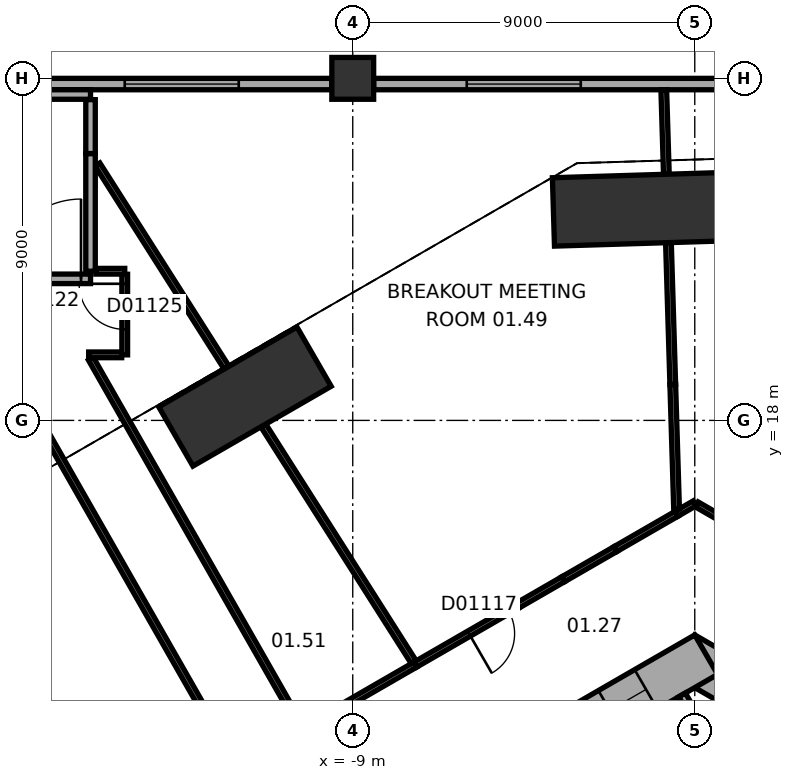
"""IFC4 building model, lengths in metres.
Left out: names, types, materials, properties, quantities, classifications, styles, units other than length and angle.
Written with IfcOpenShell. Run it as: python <this file> out.ifc"""

import sys

from ifc_helpers import new_model, si_unit, direction, frame, frame_2d, origin, origin_2d, place, context, subcontext, project, spatial, rectangle, extrude, element, fill, save


model = new_model("IFC4")
c1 = context("Model", 3, precision=1e-05, world=origin(), true_north=direction((0.0, 1.0)))
c2 = subcontext(c1, "Body", "Model", "MODEL_VIEW")
j1 = project(units=[si_unit("LENGTHUNIT", "METRE"), si_unit("PLANEANGLEUNIT", "RADIAN")], contexts=[c1])
p1 = place(None, origin())
s1 = spatial("IfcSite", under=j1, at=p1, CompositionType="ELEMENT")
p2 = place(p1, origin())
s2 = spatial("IfcBuilding", under=s1, at=p2, CompositionType="ELEMENT")
p3 = place(p2, frame((0.0, 0.0, 7.5)))
s3 = spatial("IfcBuildingStorey", under=s2, at=p3, CompositionType="ELEMENT", Elevation=7.5)
p4 = place(p3, frame((-0.72, 23.577, 0.0), z_axis=(0.0, 0.0, 1.0), x_axis=(-0.999533644135, -0.030536768695, 0.0)))
e1 = element("IfcColumn", 1, at=p4, inside=s3, PredefinedType="COLUMN", context=c2, shape_type="SweptSolid", body=[
    extrude(rectangle(XDim=6.0, YDim=1.8, at=origin_2d()), origin(), (0.0, 0.0, 1.0), 5.5),
])
p5 = place(p3, frame((-11.837, 18.627, 0.0), z_axis=(0.0, 0.0, 1.0), x_axis=(-0.866028021766, -0.499995465495, 0.0)))
e2 = element("IfcColumn", 2, at=p5, inside=s3, PredefinedType="COLUMN", context=c2, shape_type="SweptSolid", body=[
    extrude(rectangle(XDim=4.2, YDim=1.8, at=origin_2d()), origin(), (0.0, 0.0, 1.0), 5.5),
])
p6 = place(p3, frame((-9.0, 27.0, 0.0), z_axis=(0.0, 0.0, 1.0), x_axis=(1.0, 0.0, 0.0)))
e3 = element("IfcColumn", 3, at=p6, inside=s3, PredefinedType="COLUMN", context=c2, shape_type="SweptSolid", body=[
    extrude(rectangle(XDim=1.1, YDim=1.1, at=origin_2d()), origin(), (0.0, 0.0, 1.0), 5.5),
])
p7 = place(p3, frame((10.4, 5.658, 0.0), z_axis=(0.0, 0.0, 1.0), x_axis=(-0.866021384402, 0.500006961711, 0.0)))
e4 = element("IfcWall", 4, at=p7, inside=s3, PredefinedType="SHEAR", context=c2, shape_type="SweptSolid", body=[
    extrude(rectangle(XDim=12.355, YDim=1.2, at=frame_2d((6.178, 0.0))), origin(), (0.0, 0.0, 1.0), 5.5),
])
p8 = place(p7, frame((2.728, 0.0, 0.0)))
e5 = element("IfcOpeningElement", 5, at=p8, cuts=e4, PredefinedType="OPENING", context=c2, shape_type="SweptSolid", body=[
    extrude(rectangle(XDim=1.1, YDim=2.1, at=frame_2d((0.55, 1.05))), frame((0.0, 0.61, 0.0), z_axis=(0.0, -1.0, 0.0), x_axis=(1.0, 0.0, 0.0)), (0.0, 0.0, 1.0), 1.22),
])
p9 = place(p7, frame((5.328, 0.0, 0.0)))
e6 = element("IfcOpeningElement", 6, at=p9, cuts=e4, PredefinedType="OPENING", context=c2, shape_type="SweptSolid", body=[
    extrude(rectangle(XDim=1.1, YDim=2.1, at=frame_2d((0.55, 1.05))), frame((0.0, 0.61, 0.0), z_axis=(0.0, -1.0, 0.0), x_axis=(1.0, 0.0, 0.0)), (0.0, 0.0, 1.0), 1.22),
])
p10 = place(p7, frame((7.928, 0.0, 0.0)))
e7 = element("IfcOpeningElement", 7, at=p10, cuts=e4, PredefinedType="OPENING", context=c2, shape_type="SweptSolid", body=[
    extrude(rectangle(XDim=1.1, YDim=2.1, at=frame_2d((0.55, 1.05))), frame((0.0, 0.61, 0.0), z_axis=(0.0, -1.0, 0.0), x_axis=(1.0, 0.0, 0.0)), (0.0, 0.0, 1.0), 1.22),
])
p11 = place(p3, frame((0.3, 11.836, 0.0), z_axis=(0.0, 0.0, 1.0), x_axis=(-0.866021384402, -0.500006961711, 0.0)))
e8 = element("IfcWall", 8, at=p11, inside=s3, PredefinedType="SHEAR", context=c2, shape_type="SweptSolid", body=[
    extrude(rectangle(XDim=12.355, YDim=1.2, at=frame_2d((6.178, 0.0))), origin(), (0.0, 0.0, 1.0), 5.5),
])
p12 = place(p11, frame((6.378, 0.0, 0.0)))
e9 = element("IfcOpeningElement", 9, at=p12, cuts=e8, PredefinedType="OPENING", context=c2, shape_type="SweptSolid", body=[
    extrude(rectangle(XDim=1.5, YDim=2.1, at=frame_2d((0.75, 1.05))), frame((0.0, 0.61, 0.0), z_axis=(0.0, -1.0, 0.0), x_axis=(1.0, 0.0, 0.0)), (0.0, 0.0, 1.0), 1.22),
])
p13 = place(p11, frame((1.828, 0.0, 0.0)))
e10 = element("IfcOpeningElement", 10, at=p13, cuts=e8, PredefinedType="OPENING", context=c2, shape_type="SweptSolid", body=[
    extrude(rectangle(XDim=1.1, YDim=2.1, at=frame_2d((0.55, 1.05))), frame((0.0, 0.61, 0.0), z_axis=(0.0, -1.0, 0.0), x_axis=(1.0, 0.0, 0.0)), (0.0, 0.0, 1.0), 1.22),
])
p14 = place(p3, frame((8.45, 26.85, 0.0), z_axis=(0.0, 0.0, 1.0), x_axis=(-1.0, 0.0, 0.0)))
e11 = element("IfcWall", 11, at=p14, inside=s3, PredefinedType="STANDARD", context=c2, shape_type="SweptSolid", body=[
    extrude(rectangle(XDim=16.9, YDim=0.3, at=frame_2d((8.45, 0.0))), origin(), (0.0, 0.0, 1.0), 4.0),
])
p15 = place(p14, frame((2.45, 0.0, 1.0)))
e12 = element("IfcOpeningElement", 12, at=p15, cuts=e11, PredefinedType="OPENING", context=c2, shape_type="SweptSolid", body=[
    extrude(rectangle(XDim=3.0, YDim=2.6, at=frame_2d((1.5, 1.3))), frame((0.0, 0.16, 0.0), z_axis=(0.0, -1.0, 0.0), x_axis=(1.0, 0.0, 0.0)), (0.0, 0.0, 1.0), 0.32),
])
p16 = place(p14, frame((11.45, 0.0, 1.0)))
e13 = element("IfcOpeningElement", 13, at=p16, cuts=e11, PredefinedType="OPENING", context=c2, shape_type="SweptSolid", body=[
    extrude(rectangle(XDim=3.0, YDim=2.6, at=frame_2d((1.5, 1.3))), frame((0.0, 0.16, 0.0), z_axis=(0.0, -1.0, 0.0), x_axis=(1.0, 0.0, 0.0)), (0.0, 0.0, 1.0), 0.32),
])
p17 = place(p3, frame((-9.55, 26.85, 0.0), z_axis=(0.0, 0.0, 1.0), x_axis=(-1.0, 0.0, 0.0)))
e14 = element("IfcWall", 14, at=p17, inside=s3, PredefinedType="STANDARD", context=c2, shape_type="SweptSolid", body=[
    extrude(rectangle(XDim=16.9, YDim=0.3, at=frame_2d((8.45, 0.0))), origin(), (0.0, 0.0, 1.0), 4.0),
])
p18 = place(p17, frame((2.45, 0.0, 1.0)))
e15 = element("IfcOpeningElement", 15, at=p18, cuts=e14, PredefinedType="OPENING", context=c2, shape_type="SweptSolid", body=[
    extrude(rectangle(XDim=3.0, YDim=2.6, at=frame_2d((1.5, 1.3))), frame((0.0, 0.16, 0.0), z_axis=(0.0, -1.0, 0.0), x_axis=(1.0, 0.0, 0.0)), (0.0, 0.0, 1.0), 0.32),
])
p19 = place(p17, frame((11.45, 0.0, 1.0)))
e16 = element("IfcOpeningElement", 16, at=p19, cuts=e14, PredefinedType="OPENING", context=c2, shape_type="SweptSolid", body=[
    extrude(rectangle(XDim=3.0, YDim=2.6, at=frame_2d((1.5, 1.3))), frame((0.0, 0.16, 0.0), z_axis=(0.0, -1.0, 0.0), x_axis=(1.0, 0.0, 0.0)), (0.0, 0.0, 1.0), 0.32),
])
p20 = place(p3, frame((0.767, 8.872, 0.0), z_axis=(0.0, 0.0, 1.0), x_axis=(-0.499994660107, 0.866028486751, 0.0)))
e17 = element("IfcWall", 17, at=p20, inside=s3, PredefinedType="PARTITIONING", context=c2, shape_type="SweptSolid", body=[
    extrude(rectangle(XDim=2.2, YDim=0.2, at=frame_2d((1.1, 0.0))), origin(), (0.0, 0.0, 1.0), 5.2),
])
p21 = place(p3, frame((-13.806, 7.418, 0.0), z_axis=(0.0, 0.0, 1.0), x_axis=(-0.880891557551, 0.473318142305, 0.0)))
e18 = element("IfcWall", 18, at=p21, inside=s3, PredefinedType="MOVABLE", context=c2, shape_type="SweptSolid", body=[
    extrude(rectangle(XDim=7.787, YDim=0.15, at=frame_2d((3.894, 0.0))), origin(), (0.0, 0.0, 1.0), 5.2),
])
p22 = place(p3, frame((-12.092, 8.93, 0.0), z_axis=(0.0, 0.0, 1.0), x_axis=(-0.495564220718, 0.868571299977, 0.0)))
e19 = element("IfcWall", 19, at=p22, inside=s3, PredefinedType="PARTITIONING", context=c2, shape_type="SweptSolid", body=[
    extrude(rectangle(XDim=11.988, YDim=0.15, at=frame_2d((5.994, 0.0))), origin(), (0.0, 0.0, 1.0), 5.2),
])
p23 = place(p3, frame((-10.321, 9.861, 0.0), z_axis=(0.0, 0.0, 1.0), x_axis=(0.865970719175, 0.500094704563, 0.0)))
e20 = element("IfcWall", 20, at=p23, inside=s3, PredefinedType="PARTITIONING", context=c2, shape_type="SweptSolid", body=[
    extrude(rectangle(XDim=3.425, YDim=0.15, at=frame_2d((1.712, 0.0))), origin(), (0.0, 0.0, 1.0), 5.2),
])
p24 = place(p3, frame((-7.354, 11.573, 0.0), z_axis=(0.0, 0.0, 1.0), x_axis=(0.866051051954, 0.499955573435, 0.0)))
e21 = element("IfcWall", 21, at=p24, inside=s3, PredefinedType="PARTITIONING", context=c2, shape_type="SweptSolid", body=[
    extrude(rectangle(XDim=3.082, YDim=0.15, at=frame_2d((1.541, 0.0))), origin(), (0.0, 0.0, 1.0), 5.2),
])
p25 = place(p24, frame((1.632, 0.0, 0.0)))
e22 = element("IfcOpeningElement", 22, at=p25, cuts=e21, PredefinedType="OPENING", context=c2, shape_type="SweptSolid", body=[
    extrude(rectangle(XDim=1.2, YDim=2.1, at=frame_2d((0.6, 1.05))), frame((0.0, 0.085, 0.0), z_axis=(0.0, -1.0, 0.0), x_axis=(1.0, 0.0, 0.0)), (0.0, 0.0, 1.0), 0.17),
])
p26 = place(p3, frame((-7.397, 11.641, 0.0), z_axis=(0.0, 0.0, 1.0), x_axis=(-0.536312130721, 0.844019726334, 0.0)))
e23 = element("IfcWall", 23, at=p26, inside=s3, PredefinedType="PARTITIONING", context=c2, shape_type="SweptSolid", body=[
    extrude(rectangle(XDim=7.376, YDim=0.15, at=frame_2d((3.688, 0.0))), origin(), (0.0, 0.0, 1.0), 5.2),
])
p27 = place(p3, frame((-3.46, 13.822, 0.0), z_axis=(0.0, 0.0, 1.0), x_axis=(-0.866004557827, -0.500036104519, 0.0)))
e24 = element("IfcWall", 24, at=p27, inside=s3, PredefinedType="PARTITIONING", context=c2, shape_type="SweptSolid", body=[
    extrude(rectangle(XDim=1.415, YDim=0.15, at=frame_2d((0.708, 0.0))), origin(), (0.0, 0.0, 1.0), 5.2),
])
p28 = place(p3, frame((3.386, 13.865, 0.0), z_axis=(0.0, 0.0, 1.0), x_axis=(-0.866006051527, 0.500033517596, 0.0)))
e25 = element("IfcWall", 25, at=p28, inside=s3, PredefinedType="PARTITIONING", context=c2, shape_type="SweptSolid", body=[
    extrude(rectangle(XDim=3.85, YDim=0.15, at=frame_2d((1.925, 0.0))), origin(), (0.0, 0.0, 1.0), 5.2),
])
p29 = place(p3, frame((-2.087, 14.615, 0.0), z_axis=(0.0, 0.0, 1.0), x_axis=(-0.866054784643, -0.499949107407, 0.0)))
e26 = element("IfcWall", 26, at=p29, inside=s3, PredefinedType="PARTITIONING", context=c2, shape_type="SweptSolid", body=[
    extrude(rectangle(XDim=1.585, YDim=0.15, at=frame_2d((0.792, 0.0))), origin(), (0.0, 0.0, 1.0), 5.2),
])
p30 = place(p3, frame((-2.087, 14.615, 0.0), z_axis=(0.0, 0.0, 1.0), x_axis=(0.866006459158, 0.500032811619, 0.0)))
e27 = element("IfcWall", 27, at=p30, inside=s3, PredefinedType="PARTITIONING", context=c2, shape_type="SweptSolid", body=[
    extrude(rectangle(XDim=1.861, YDim=0.15, at=frame_2d((0.931, 0.0))), origin(), (0.0, 0.0, 1.0), 5.2),
])
p31 = place(p3, frame((-0.475, 15.545, 0.0), z_axis=(0.0, 0.0, 1.0), x_axis=(0.865933599817, 0.500158975434, 0.0)))
e28 = element("IfcWall", 28, at=p31, inside=s3, PredefinedType="PARTITIONING", context=c2, shape_type="SweptSolid", body=[
    extrude(rectangle(XDim=0.549, YDim=0.15, at=frame_2d((0.274, 0.0))), origin(), (0.0, 0.0, 1.0), 5.2),
])
p32 = place(p3, frame((-0.579, 18.946, 0.0), z_axis=(0.0, 0.0, 1.0), x_axis=(0.030572886356, -0.999532540051, 0.0)))
e29 = element("IfcWall", 29, at=p32, inside=s3, PredefinedType="PARTITIONING", context=c2, shape_type="SweptSolid", body=[
    extrude(rectangle(XDim=3.282, YDim=0.15, at=frame_2d((1.641, 0.0))), origin(), (0.0, 0.0, 1.0), 5.2),
])
p33 = place(p3, frame((-0.579, 18.946, 0.0), z_axis=(0.0, 0.0, 1.0), x_axis=(-0.030471255388, 0.999535643484, 0.0)))
e30 = element("IfcWall", 30, at=p33, inside=s3, PredefinedType="PARTITIONING", context=c2, shape_type="SweptSolid", body=[
    extrude(rectangle(XDim=3.734, YDim=0.15, at=frame_2d((1.867, 0.0))), origin(), (0.0, 0.0, 1.0), 5.2),
])
p34 = place(p3, frame((-12.32, 19.387, 0.0), z_axis=(0.0, 0.0, 1.0), x_axis=(-0.536309341483, 0.844021498682, 0.0)))
e31 = element("IfcWall", 31, at=p34, inside=s3, PredefinedType="PARTITIONING", context=c2, shape_type="SweptSolid", body=[
    extrude(rectangle(XDim=6.335, YDim=0.15, at=frame_2d((3.168, 0.0))), origin(), (0.0, 0.0, 1.0), 5.2),
])
p35 = place(p3, frame((-15.889, 19.621, 0.0), z_axis=(0.0, 0.0, 1.0), x_axis=(0.495540263005, -0.868584968636, 0.0)))
e32 = element("IfcWall", 32, at=p35, inside=s3, PredefinedType="PARTITIONING", context=c2, shape_type="SweptSolid", body=[
    extrude(rectangle(XDim=11.157, YDim=0.15, at=frame_2d((5.579, 0.0))), origin(), (0.0, 0.0, 1.0), 5.2),
])
p36 = place(p3, frame((-15.08, 19.725, 0.0), z_axis=(0.0, 0.0, 1.0), x_axis=(-1.0, 0.0, 0.0)))
e33 = element("IfcWall", 33, at=p36, inside=s3, PredefinedType="PARTITIONING", context=c2, shape_type="SweptSolid", body=[
    extrude(rectangle(XDim=0.868, YDim=0.15, at=frame_2d((0.434, 0.0))), origin(), (0.0, 0.0, 1.0), 5.2),
])
p37 = place(p3, frame((-15.9, 21.725, 0.0), z_axis=(0.0, 0.0, 1.0), x_axis=(-1.0, 0.0, 0.0)))
e34 = element("IfcWall", 34, at=p37, inside=s3, PredefinedType="SOLIDWALL", context=c2, shape_type="SweptSolid", body=[
    extrude(rectangle(XDim=3.3, YDim=0.25, at=frame_2d((1.65, 0.0))), origin(), (0.0, 0.0, 1.0), 5.2),
])
p38 = place(p37, frame((0.25, 0.0, 0.0)))
e35 = element("IfcOpeningElement", 35, at=p38, cuts=e34, PredefinedType="OPENING", context=c2, shape_type="SweptSolid", body=[
    extrude(rectangle(XDim=2.1, YDim=2.4, at=frame_2d((1.05, 1.2))), frame((0.0, 0.135, 0.0), z_axis=(0.0, -1.0, 0.0), x_axis=(1.0, 0.0, 0.0)), (0.0, 0.0, 1.0), 0.27),
])
p39 = place(p3, frame((-15.0, 21.845, 0.0), z_axis=(0.0, 0.0, 1.0), x_axis=(0.0, -1.0, 0.0)))
e36 = element("IfcWall", 36, at=p39, inside=s3, PredefinedType="PARTITIONING", context=c2, shape_type="SweptSolid", body=[
    extrude(rectangle(XDim=2.12, YDim=0.15, at=frame_2d((1.06, 0.0))), origin(), (0.0, 0.0, 1.0), 5.2),
])
p40 = place(p39, frame((0.25, 0.0, 0.0)))
e37 = element("IfcOpeningElement", 37, at=p40, cuts=e36, PredefinedType="OPENING", context=c2, shape_type="SweptSolid", body=[
    extrude(rectangle(XDim=1.2, YDim=2.1, at=frame_2d((0.6, 1.05))), frame((0.0, 0.085, 0.0), z_axis=(0.0, -1.0, 0.0), x_axis=(1.0, 0.0, 0.0)), (0.0, 0.0, 1.0), 0.17),
])
p41 = place(p3, frame((-15.76, 21.925, 0.0), z_axis=(0.0, 0.0, 1.0), x_axis=(1.0, 0.0, 0.0)))
e38 = element("IfcWall", 38, at=p41, inside=s3, PredefinedType="PARTITIONING", context=c2, shape_type="SweptSolid", body=[
    extrude(rectangle(XDim=0.76, YDim=0.15, at=frame_2d((0.38, 0.0))), origin(), (0.0, 0.0, 1.0), 5.2),
])
p42 = place(p3, frame((-0.748, 24.477, 0.0), z_axis=(0.0, 0.0, 1.0), x_axis=(-0.030405439098, 0.999537647752, 0.0)))
e39 = element("IfcWall", 39, at=p42, inside=s3, PredefinedType="PARTITIONING", context=c2, shape_type="SweptSolid", body=[
    extrude(rectangle(XDim=2.224, YDim=0.15, at=frame_2d((1.112, 0.0))), origin(), (0.0, 0.0, 1.0), 5.2),
])
p43 = place(p3, frame((-15.9, 25.021, 0.0), z_axis=(0.0, 0.0, 1.0), x_axis=(0.0, -1.0, 0.0)))
e40 = element("IfcWall", 40, at=p43, inside=s3, PredefinedType="SOLIDWALL", context=c2, shape_type="SweptSolid", body=[
    extrude(rectangle(XDim=3.096, YDim=0.25, at=frame_2d((1.548, 0.0))), origin(), (0.0, 0.0, 1.0), 5.2),
])
p44 = place(p3, frame((-15.9, 26.44, 0.0), z_axis=(0.0, 0.0, 1.0), x_axis=(0.0, -1.0, 0.0)))
e41 = element("IfcWall", 41, at=p44, inside=s3, PredefinedType="SOLIDWALL", context=c2, shape_type="SweptSolid", body=[
    extrude(rectangle(XDim=1.418, YDim=0.25, at=frame_2d((0.709, 0.0))), origin(), (0.0, 0.0, 1.0), 5.2),
])
p45 = place(p3, frame((-26.45, 26.575, 0.0), z_axis=(0.0, 0.0, 1.0), x_axis=(1.0, 0.0, 0.0)))
e42 = element("IfcWall", 42, at=p45, inside=s3, PredefinedType="SOLIDWALL", context=c2, shape_type="SweptSolid", body=[
    extrude(rectangle(XDim=10.55, YDim=0.25, at=frame_2d((5.275, 0.0))), origin(), (0.0, 0.0, 1.0), 5.2),
])
p46 = place(p16, origin())
e43 = element("IfcWindow", 43, at=p46, inside=s3, PartitioningType="SINGLE_PANEL", PredefinedType="WINDOW", context=c2, shape_type="SweptSolid", body=[
    extrude(rectangle(XDim=3.0, YDim=2.6, at=frame_2d((1.5, 1.3))), frame((0.0, 0.03, 0.0), z_axis=(0.0, -1.0, 0.0), x_axis=(1.0, 0.0, 0.0)), (0.0, 0.0, 1.0), 0.06),
])
fill(e13, e43)
p47 = place(p18, origin())
e44 = element("IfcWindow", 44, at=p47, inside=s3, PartitioningType="SINGLE_PANEL", PredefinedType="WINDOW", context=c2, shape_type="SweptSolid", body=[
    extrude(rectangle(XDim=3.0, YDim=2.6, at=frame_2d((1.5, 1.3))), frame((0.0, 0.03, 0.0), z_axis=(0.0, -1.0, 0.0), x_axis=(1.0, 0.0, 0.0)), (0.0, 0.0, 1.0), 0.06),
])
fill(e15, e44)
p48 = place(p13, origin())
e45 = element("IfcDoor", 45, at=p48, inside=s3, OperationType="DOUBLE_DOOR_SLIDING", PredefinedType="DOOR", context=c2, shape_type="SweptSolid", body=[
    extrude(rectangle(XDim=1.1, YDim=2.1, at=frame_2d((0.55, 1.05))), frame((0.0, 0.025, 0.0), z_axis=(0.0, -1.0, 0.0), x_axis=(1.0, 0.0, 0.0)), (0.0, 0.0, 1.0), 0.05),
])
fill(e10, e45)
p49 = place(p25, origin())
e46 = element("IfcDoor", 46, at=p49, inside=s3, OperationType="SINGLE_SWING_LEFT", PredefinedType="DOOR", context=c2, shape_type="SweptSolid", body=[
    extrude(rectangle(XDim=1.2, YDim=2.1, at=frame_2d((0.6, 1.05))), frame((0.0, 0.025, 0.0), z_axis=(0.0, -1.0, 0.0), x_axis=(1.0, 0.0, 0.0)), (0.0, 0.0, 1.0), 0.05),
])
fill(e22, e46)
p50 = place(p38, frame((2.1, 0.0, 0.0), z_axis=(0.0, 0.0, 1.0), x_axis=(-1.0, 0.0, 0.0)))
e47 = element("IfcDoor", 47, at=p50, inside=s3, OperationType="DOUBLE_DOOR_SINGLE_SWING", PredefinedType="DOOR", context=c2, shape_type="SweptSolid", body=[
    extrude(rectangle(XDim=2.1, YDim=2.4, at=frame_2d((1.05, 1.2))), frame((0.0, 0.025, 0.0), z_axis=(0.0, -1.0, 0.0), x_axis=(1.0, 0.0, 0.0)), (0.0, 0.0, 1.0), 0.05),
])
fill(e35, e47)
p51 = place(p40, origin())
e48 = element("IfcDoor", 48, at=p51, inside=s3, OperationType="SINGLE_SWING_LEFT", PredefinedType="DOOR", context=c2, shape_type="SweptSolid", body=[
    extrude(rectangle(XDim=1.2, YDim=2.1, at=frame_2d((0.6, 1.05))), frame((0.0, 0.025, 0.0), z_axis=(0.0, -1.0, 0.0), x_axis=(1.0, 0.0, 0.0)), (0.0, 0.0, 1.0), 0.05),
])
fill(e37, e48)
save(model, sys.argv[1])
